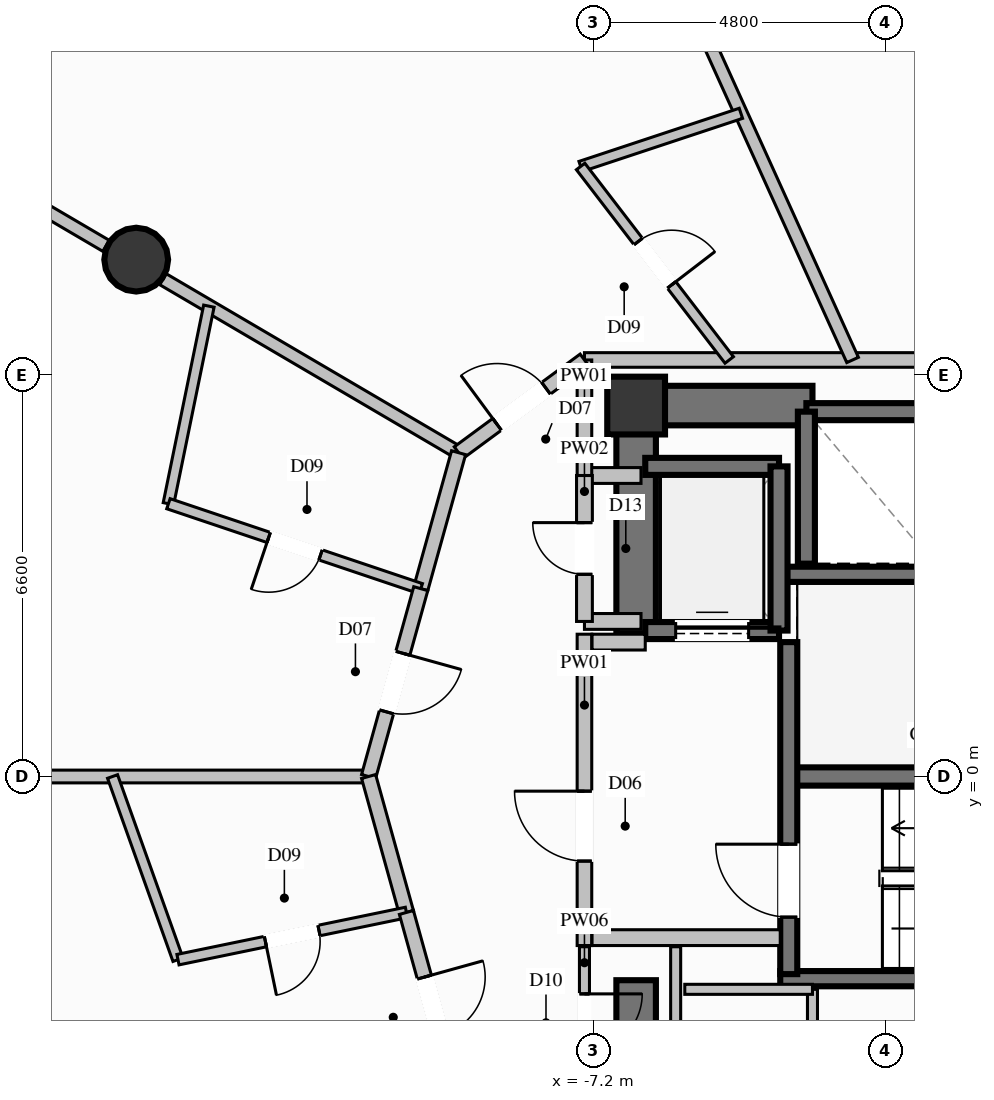
"""IFC4 building model, lengths in metres.
Left out: names, types, materials, properties, quantities, classifications, styles, units other than length and angle.
Written with IfcOpenShell. Run it as: python <this file> out.ifc"""

import sys

from ifc_helpers import new_model, si_unit, direction, frame, frame_2d, origin, origin_2d, place, context, subcontext, project, spatial, rectangle, circle, extrude, element, fill, save


model = new_model("IFC4")
c1 = context("Model", 3, precision=1e-05, world=origin(), true_north=direction((0.0, 1.0)))
c2 = subcontext(c1, "Body", "Model", "MODEL_VIEW")
j1 = project(units=[si_unit("LENGTHUNIT", "METRE"), si_unit("PLANEANGLEUNIT", "RADIAN")], contexts=[c1])
p1 = place(None, origin())
s1 = spatial("IfcSite", under=j1, at=p1, CompositionType="ELEMENT")
p2 = place(p1, origin())
s2 = spatial("IfcBuilding", under=s1, at=p2, CompositionType="ELEMENT")
p3 = place(p2, frame((0.0, 0.0, 127.8)))
s3 = spatial("IfcBuildingStorey", under=s2, at=p3, CompositionType="ELEMENT", Elevation=127.8)
p4 = place(p3, frame((-6.5, 6.1, 0.0), z_axis=(0.0, 0.0, 1.0), x_axis=(1.0, 0.0, 0.0)))
e1 = element("IfcColumn", 1, at=p4, inside=s3, PredefinedType="COLUMN", context=c2, shape_type="SweptSolid", body=[
    extrude(rectangle(XDim=0.95, YDim=0.95, at=origin_2d()), origin(), (0.0, 0.0, 1.0), 3.6),
])
p5 = place(p3, frame((-3.99, 0.0, 0.0), z_axis=(0.0, 0.0, 1.0), x_axis=(1.0, 0.0, 0.0)))
e2 = element("IfcWall", 2, at=p5, inside=s3, PredefinedType="SHEAR", context=c2, shape_type="SweptSolid", body=[
    extrude(rectangle(XDim=7.98, YDim=0.3, at=frame_2d((3.99, 0.0))), origin(), (0.0, 0.0, 1.0), 3.6),
])
for number, where, z_axis, x_axis in (
    (3, (-4.13, -3.325, 0.0), (0.0, 0.0, 1.0), (1.0, 0.0, 0.0)),
    (4, (-4.13, 3.325, 0.0), (0.0, 0.0, 1.0), (1.0, 0.0, 0.0)),
):
    element("IfcWall", number, at=place(p3, frame(where, z_axis=z_axis, x_axis=x_axis)), inside=s3, PredefinedType="SOLIDWALL", context=c2, shape_type="SweptSolid", body=[
        extrude(rectangle(XDim=8.26, YDim=0.25, at=frame_2d((4.13, 0.0))), origin(), (0.0, 0.0, 1.0), 3.6),
    ])
p6 = place(p3, frame((-6.175, 6.1, 0.0), z_axis=(0.0, 0.0, 1.0), x_axis=(1.0, 0.0, 0.0)))
e5 = element("IfcWall", 5, at=p6, inside=s3, PredefinedType="SHEAR", context=c2, shape_type="SweptSolid", body=[
    extrude(rectangle(XDim=2.575, YDim=0.65, at=frame_2d((1.288, 0.0))), origin(), (0.0, 0.0, 1.0), 3.6),
])
p7 = place(p3, frame((-6.5, 2.35, 0.0), z_axis=(0.0, 0.0, 1.0), x_axis=(0.0, 1.0, 0.0)))
e6 = element("IfcWall", 6, at=p7, inside=s3, PredefinedType="SHEAR", context=c2, shape_type="SweptSolid", body=[
    extrude(rectangle(XDim=4.075, YDim=0.65, at=frame_2d((2.038, 0.0))), origin(), (0.0, 0.0, 1.0), 3.6),
])
p8 = place(p3, frame((-6.5, -6.425, 0.0), z_axis=(0.0, 0.0, 1.0), x_axis=(0.0, 1.0, 0.0)))
e7 = element("IfcWall", 7, at=p8, inside=s3, PredefinedType="SHEAR", context=c2, shape_type="SweptSolid", body=[
    extrude(rectangle(XDim=3.075, YDim=0.65, at=frame_2d((1.538, 0.0))), origin(), (0.0, 0.0, 1.0), 3.6),
])
p9 = place(p3, frame((-14.722, 8.5, 0.0), z_axis=(0.0, 0.0, 1.0), x_axis=(1.0, 0.0, 0.0)))
e8 = element("IfcColumn", 8, at=p9, inside=s3, PredefinedType="COLUMN", context=c2, shape_type="SweptSolid", body=[
    extrude(circle(Radius=0.525, at=origin_2d()), origin(), (0.0, 0.0, 1.0), 3.6),
])
p10 = place(p3, frame((-1.6, 6.0, 0.0), z_axis=(0.0, 0.0, 1.0), x_axis=(-1.0, 0.0, 0.0)))
e9 = element("IfcWall", 9, at=p10, inside=s3, PredefinedType="SOLIDWALL", context=c2, shape_type="SweptSolid", body=[
    extrude(rectangle(XDim=2.1, YDim=0.28, at=frame_2d((1.05, 0.0))), origin(), (0.0, 0.0, 1.0), 3.35),
])
p11 = place(p3, frame((-3.7, 6.0, 0.0), z_axis=(0.0, 0.0, 1.0), x_axis=(0.0, -1.0, 0.0)))
e10 = element("IfcWall", 10, at=p11, inside=s3, PredefinedType="SOLIDWALL", context=c2, shape_type="SweptSolid", body=[
    extrude(rectangle(XDim=2.5, YDim=0.28, at=frame_2d((1.25, 0.0))), origin(), (0.0, 0.0, 1.0), 3.35),
])
p12 = place(p3, frame((-6.35, 2.4, 0.0), z_axis=(0.0, 0.0, 1.0), x_axis=(1.0, 0.0, 0.0)))
e11 = element("IfcWall", 11, at=p12, inside=s3, PredefinedType="SOLIDWALL", context=c2, shape_type="SweptSolid", body=[
    extrude(rectangle(XDim=2.2, YDim=0.28, at=frame_2d((1.1, 0.0))), origin(), (0.0, 0.0, 1.0), 3.35),
])
p13 = place(p12, frame((0.5, 0.0, 0.0)))
e12 = element("IfcOpeningElement", 12, at=p13, cuts=e11, PredefinedType="OPENING", context=c2, shape_type="SweptSolid", body=[
    extrude(rectangle(XDim=1.2, YDim=2.2, at=frame_2d((0.6, 1.1))), frame((0.0, 0.15, 0.0), z_axis=(0.0, -1.0, 0.0), x_axis=(1.0, 0.0, 0.0)), (0.0, 0.0, 1.0), 0.3),
])
p14 = place(p3, frame((-4.15, 5.1, 0.0), z_axis=(0.0, 0.0, 1.0), x_axis=(-1.0, 0.0, 0.0)))
e13 = element("IfcWall", 13, at=p14, inside=s3, PredefinedType="SOLIDWALL", context=c2, shape_type="SweptSolid", body=[
    extrude(rectangle(XDim=2.2, YDim=0.28, at=frame_2d((1.1, 0.0))), origin(), (0.0, 0.0, 1.0), 3.35),
])
p15 = place(p3, frame((-4.15, 2.4, 0.0), z_axis=(0.0, 0.0, 1.0), x_axis=(0.0, 1.0, 0.0)))
e14 = element("IfcWall", 14, at=p15, inside=s3, PredefinedType="SOLIDWALL", context=c2, shape_type="SweptSolid", body=[
    extrude(rectangle(XDim=2.7, YDim=0.28, at=frame_2d((1.35, 0.0))), origin(), (0.0, 0.0, 1.0), 3.35),
])
p16 = place(p3, frame((-3.99, -3.25, 0.0), z_axis=(0.0, 0.0, 1.0), x_axis=(0.0, 1.0, 0.0)))
e15 = element("IfcWall", 15, at=p16, inside=s3, PredefinedType="SOLIDWALL", context=c2, shape_type="SweptSolid", body=[
    extrude(rectangle(XDim=5.46, YDim=0.28, at=frame_2d((2.73, 0.0))), origin(), (0.0, 0.0, 1.0), 3.35),
])
p17 = place(p16, frame((0.937, 0.0, 0.0)))
e16 = element("IfcOpeningElement", 16, at=p17, cuts=e15, PredefinedType="OPENING", context=c2, shape_type="SweptSolid", body=[
    extrude(rectangle(XDim=1.2, YDim=2.2, at=frame_2d((0.6, 1.1))), frame((0.0, 0.15, 0.0), z_axis=(0.0, -1.0, 0.0), x_axis=(1.0, 0.0, 0.0)), (0.0, 0.0, 1.0), 0.3),
])
p18 = place(p3, frame((-7.35, -2.78, 0.0), z_axis=(0.0, 0.0, 1.0), x_axis=(0.0, 1.0, 0.0)))
e17 = element("IfcWall", 17, at=p18, inside=s3, PredefinedType="PARTITIONING", context=c2, shape_type="SweptSolid", body=[
    extrude(rectangle(XDim=5.12, YDim=0.24, at=frame_2d((2.56, 0.0))), origin(), (0.0, 0.0, 1.0), 2.435),
])
p19 = place(p18, frame((1.389, 0.0, 0.0)))
e18 = element("IfcOpeningElement", 18, at=p19, cuts=e17, PredefinedType="OPENING", context=c2, shape_type="SweptSolid", body=[
    extrude(rectangle(XDim=1.15, YDim=2.2, at=frame_2d((0.575, 1.1))), frame((0.0, 0.13, 0.0), z_axis=(0.0, -1.0, 0.0), x_axis=(1.0, 0.0, 0.0)), (0.0, 0.0, 1.0), 0.26),
])
p20 = place(p3, frame((-7.225, -2.65, 0.0), z_axis=(0.0, 0.0, 1.0), x_axis=(1.0, 0.0, 0.0)))
e19 = element("IfcWall", 19, at=p20, inside=s3, PredefinedType="PARTITIONING", context=c2, shape_type="SweptSolid", body=[
    extrude(rectangle(XDim=3.095, YDim=0.26, at=frame_2d((1.548, 0.0))), origin(), (0.0, 0.0, 1.0), 3.35),
])
p21 = place(p3, frame((-7.225, 2.21, 0.0), z_axis=(0.0, 0.0, 1.0), x_axis=(1.0, 0.0, 0.0)))
e20 = element("IfcWall", 20, at=p21, inside=s3, PredefinedType="PARTITIONING", context=c2, shape_type="SweptSolid", body=[
    extrude(rectangle(XDim=0.875, YDim=0.26, at=frame_2d((0.438, 0.0))), origin(), (0.0, 0.0, 1.0), 3.35),
])
for number, where, z_axis, x_axis in (
    (21, (-7.35, 4.95, 0.0), (0.0, 0.0, 1.0), (1.0, 0.0, 0.0)),
    (22, (-7.35, 2.55, 0.0), (0.0, 0.0, 1.0), (1.0, 0.0, 0.0)),
):
    element("IfcWall", number, at=place(p3, frame(where, z_axis=z_axis, x_axis=x_axis)), inside=s3, PredefinedType="PARTITIONING", context=c2, shape_type="SweptSolid", body=[
        extrude(rectangle(XDim=0.93, YDim=0.26, at=frame_2d((0.465, 0.0))), origin(), (0.0, 0.0, 1.0), 3.35),
    ])
p22 = place(p3, frame((-7.35, 2.55, 0.0), z_axis=(0.0, 0.0, 1.0), x_axis=(0.0, 1.0, 0.0)))
e23 = element("IfcWall", 23, at=p22, inside=s3, PredefinedType="PARTITIONING", context=c2, shape_type="SweptSolid", body=[
    extrude(rectangle(XDim=2.4, YDim=0.26, at=frame_2d((1.2, 0.0))), origin(), (0.0, 0.0, 1.0), 2.435),
])
p23 = place(p22, frame((0.775, 0.0, 0.0)))
e24 = element("IfcOpeningElement", 24, at=p23, cuts=e23, PredefinedType="OPENING", context=c2, shape_type="SweptSolid", body=[
    extrude(rectangle(XDim=0.85, YDim=2.05, at=frame_2d((0.425, 1.025))), frame((0.0, 0.14, 0.0), z_axis=(0.0, -1.0, 0.0), x_axis=(1.0, 0.0, 0.0)), (0.0, 0.0, 1.0), 0.28),
])
p24 = place(p3, frame((-7.35, 6.85, 0.0), z_axis=(0.0, 0.0, 1.0), x_axis=(1.0, 0.0, 0.0)))
e25 = element("IfcWall", 25, at=p24, inside=s3, PredefinedType="PARTITIONING", context=c2, shape_type="SweptSolid", body=[
    extrude(rectangle(XDim=14.7, YDim=0.24, at=frame_2d((7.35, 0.0))), origin(), (0.0, 0.0, 1.0), 2.435),
])
p25 = place(p3, frame((-7.35, 4.95, 0.0), z_axis=(0.0, 0.0, 1.0), x_axis=(0.0, 1.0, 0.0)))
e26 = element("IfcWall", 26, at=p25, inside=s3, PredefinedType="PARTITIONING", context=c2, shape_type="SweptSolid", body=[
    extrude(rectangle(XDim=1.9, YDim=0.24, at=frame_2d((0.95, 0.0))), origin(), (0.0, 0.0, 1.0), 2.435),
])
p26 = place(p3, frame((-5.85, -5.3, 0.0), z_axis=(0.0, 0.0, 1.0), x_axis=(0.0, 1.0, 0.0)))
e27 = element("IfcWall", 27, at=p26, inside=s3, PredefinedType="PARTITIONING", context=c2, shape_type="SweptSolid", body=[
    extrude(rectangle(XDim=2.5, YDim=0.165, at=frame_2d((1.25, 0.0))), origin(), (0.0, 0.0, 1.0), 2.435),
])
p27 = place(p3, frame((-7.35, -2.8, 0.0), z_axis=(0.0, 0.0, 1.0), x_axis=(0.0, -1.0, 0.0)))
e28 = element("IfcWall", 28, at=p27, inside=s3, PredefinedType="PARTITIONING", context=c2, shape_type="SweptSolid", body=[
    extrude(rectangle(XDim=2.5, YDim=0.165, at=frame_2d((1.25, 0.0))), origin(), (0.0, 0.0, 1.0), 3.35),
])
p28 = place(p27, frame((0.775, 0.0, 0.0)))
e29 = element("IfcOpeningElement", 29, at=p28, cuts=e28, PredefinedType="OPENING", context=c2, shape_type="SweptSolid", body=[
    extrude(rectangle(XDim=0.95, YDim=2.1, at=frame_2d((0.475, 1.05))), frame((0.0, 0.093, 0.0), z_axis=(0.0, -1.0, 0.0), x_axis=(1.0, 0.0, 0.0)), (0.0, 0.0, 1.0), 0.185),
])
p29 = place(p3, frame((-3.6, -6.85, 0.0), z_axis=(0.0, 0.0, 1.0), x_axis=(0.0, 1.0, 0.0)))
e30 = element("IfcWall", 30, at=p29, inside=s3, PredefinedType="PARTITIONING", context=c2, shape_type="SweptSolid", body=[
    extrude(rectangle(XDim=3.35, YDim=0.165, at=frame_2d((1.675, 0.0))), origin(), (0.0, 0.0, 1.0), 3.35),
])
p30 = place(p3, frame((-3.6, -3.5, 0.0), z_axis=(0.0, 0.0, 1.0), x_axis=(-1.0, 0.0, 0.0)))
e31 = element("IfcWall", 31, at=p30, inside=s3, PredefinedType="PARTITIONING", context=c2, shape_type="SweptSolid", body=[
    extrude(rectangle(XDim=2.1, YDim=0.165, at=frame_2d((1.05, 0.0))), origin(), (0.0, 0.0, 1.0), 3.35),
])
p31 = place(p3, frame((-9.42, 5.325, 0.0), z_axis=(0.0, 0.0, 1.0), x_axis=(-0.862477017481, 0.506096230293, 0.0)))
e32 = element("IfcWall", 32, at=p31, inside=s3, PredefinedType="PARTITIONING", context=c2, shape_type="SweptSolid", body=[
    extrude(rectangle(XDim=5.637, YDim=0.21, at=frame_2d((2.819, 0.0))), origin(), (0.0, 0.0, 1.0), 2.717),
])
p32 = place(p3, frame((-15.218, 8.727, 0.0), z_axis=(0.0, 0.0, 1.0), x_axis=(-0.862512809527, 0.506035229409, 0.0)))
e33 = element("IfcWall", 33, at=p32, inside=s3, PredefinedType="PARTITIONING", context=c2, shape_type="SweptSolid", body=[
    extrude(rectangle(XDim=7.282, YDim=0.21, at=frame_2d((3.641, 0.0))), origin(), (0.0, 0.0, 1.0), 3.35),
])
p33 = place(p3, frame((-10.9, 0.0, 0.0), z_axis=(0.0, 0.0, 1.0), x_axis=(-1.0, 0.0, 0.0)))
e34 = element("IfcWall", 34, at=p33, inside=s3, PredefinedType="PARTITIONING", context=c2, shape_type="SweptSolid", body=[
    extrude(rectangle(XDim=5.555, YDim=0.21, at=frame_2d((2.778, 0.0))), origin(), (0.0, 0.0, 1.0), 3.35),
])
p34 = place(p3, frame((-2.94, 6.85, 0.0), z_axis=(0.0, 0.0, 1.0), x_axis=(-0.412479187099, 0.910967024765, 0.0)))
e35 = element("IfcWall", 35, at=p34, inside=s3, PredefinedType="PARTITIONING", context=c2, shape_type="SweptSolid", body=[
    extrude(rectangle(XDim=15.902, YDim=0.21, at=frame_2d((7.951, 0.0))), origin(), (0.0, 0.0, 1.0), 3.35),
])
p35 = place(p3, frame((-7.413, 10.032, 0.0), z_axis=(0.0, 0.0, 1.0), x_axis=(0.949183203982, 0.314724078008, 0.0)))
e36 = element("IfcWall", 36, at=p35, inside=s3, PredefinedType="PLUMBINGWALL", context=c2, shape_type="SweptSolid", body=[
    extrude(rectangle(XDim=2.777, YDim=0.175, at=frame_2d((1.389, 0.0))), origin(), (0.0, 0.0, 1.0), 3.35),
])
p36 = place(p3, frame((-7.413, 10.032, 0.0), z_axis=(0.0, 0.0, 1.0), x_axis=(0.609160709833, -0.793046801643, 0.0)))
e37 = element("IfcWall", 37, at=p36, inside=s3, PredefinedType="PLUMBINGWALL", context=c2, shape_type="SweptSolid", body=[
    extrude(rectangle(XDim=4.012, YDim=0.175, at=frame_2d((2.006, 0.0))), origin(), (0.0, 0.0, 1.0), 2.717),
])
p37 = place(p36, frame((1.556, 0.0, 0.0)))
e38 = element("IfcOpeningElement", 38, at=p37, cuts=e37, PredefinedType="OPENING", context=c2, shape_type="SweptSolid", body=[
    extrude(rectangle(XDim=0.9, YDim=2.1, at=frame_2d((0.45, 1.05))), frame((0.0, 0.098, 0.0), z_axis=(0.0, -1.0, 0.0), x_axis=(1.0, 0.0, 0.0)), (0.0, 0.0, 1.0), 0.195),
])
p38 = place(p3, frame((-9.42, 5.325, 0.0), z_axis=(0.0, 0.0, 1.0), x_axis=(0.805053450612, 0.593202277185, 0.0)))
e39 = element("IfcWall", 39, at=p38, inside=s3, PredefinedType="PARTITIONING", context=c2, shape_type="SweptSolid", body=[
    extrude(rectangle(XDim=2.571, YDim=0.24, at=frame_2d((1.286, 0.0))), origin(), (0.0, 0.0, 1.0), 3.35),
])
p39 = place(p38, frame((0.786, 0.0, 0.0)))
e40 = element("IfcOpeningElement", 40, at=p39, cuts=e39, PredefinedType="OPENING", context=c2, shape_type="SweptSolid", body=[
    extrude(rectangle(XDim=1.0, YDim=2.2, at=frame_2d((0.5, 1.1))), frame((0.0, 0.13, 0.0), z_axis=(0.0, -1.0, 0.0), x_axis=(1.0, 0.0, 0.0)), (0.0, 0.0, 1.0), 0.26),
])
p40 = place(p3, frame((-9.42, 5.325, 0.0), z_axis=(0.0, 0.0, 1.0), x_axis=(-0.268045342481, -0.963406297662, 0.0)))
e41 = element("IfcWall", 41, at=p40, inside=s3, PredefinedType="PARTITIONING", context=c2, shape_type="SweptSolid", body=[
    extrude(rectangle(XDim=2.321, YDim=0.24, at=frame_2d((1.16, 0.0))), origin(), (0.0, 0.0, 1.0), 3.35),
])
p41 = place(p3, frame((-13.527, 7.735, 0.0), z_axis=(0.0, 0.0, 1.0), x_axis=(-0.200460473107, -0.979701790711, 0.0)))
e42 = element("IfcWall", 42, at=p41, inside=s3, PredefinedType="PLUMBINGWALL", context=c2, shape_type="SweptSolid", body=[
    extrude(rectangle(XDim=3.316, YDim=0.175, at=frame_2d((1.658, 0.0))), origin(), (0.0, 0.0, 1.0), 3.35),
])
p42 = place(p3, frame((-10.042, 3.089, 0.0), z_axis=(0.0, 0.0, 1.0), x_axis=(-0.947742433388, 0.319036486872, 0.0)))
e43 = element("IfcWall", 43, at=p42, inside=s3, PredefinedType="PLUMBINGWALL", context=c2, shape_type="SweptSolid", body=[
    extrude(rectangle(XDim=4.379, YDim=0.175, at=frame_2d((2.189, 0.0))), origin(), (0.0, 0.0, 1.0), 3.35),
])
p43 = place(p42, frame((1.739, 0.0, 0.0)))
e44 = element("IfcOpeningElement", 44, at=p43, cuts=e43, PredefinedType="OPENING", context=c2, shape_type="SweptSolid", body=[
    extrude(rectangle(XDim=0.9, YDim=2.1, at=frame_2d((0.45, 1.05))), frame((0.0, 0.098, 0.0), z_axis=(0.0, -1.0, 0.0), x_axis=(1.0, 0.0, 0.0)), (0.0, 0.0, 1.0), 0.195),
])
p44 = place(p3, frame((-10.042, 3.089, 0.0), z_axis=(0.0, 0.0, 1.0), x_axis=(-0.267592805492, -0.963532091032, 0.0)))
e45 = element("IfcWall", 45, at=p44, inside=s3, PredefinedType="PARTITIONING", context=c2, shape_type="SweptSolid", body=[
    extrude(rectangle(XDim=3.206, YDim=0.24, at=frame_2d((1.603, 0.0))), origin(), (0.0, 0.0, 1.0), 3.35),
])
p45 = place(p44, frame((1.103, 0.0, 0.0)))
e46 = element("IfcOpeningElement", 46, at=p45, cuts=e45, PredefinedType="OPENING", context=c2, shape_type="SweptSolid", body=[
    extrude(rectangle(XDim=1.0, YDim=2.2, at=frame_2d((0.5, 1.1))), frame((0.0, 0.13, 0.0), z_axis=(0.0, -1.0, 0.0), x_axis=(1.0, 0.0, 0.0)), (0.0, 0.0, 1.0), 0.26),
])
p46 = place(p3, frame((-10.9, 0.0, 0.0), z_axis=(0.0, 0.0, 1.0), x_axis=(0.267920543299, -0.963441011416, 0.0)))
e47 = element("IfcWall", 47, at=p46, inside=s3, PredefinedType="PARTITIONING", context=c2, shape_type="SweptSolid", body=[
    extrude(rectangle(XDim=2.321, YDim=0.24, at=frame_2d((1.161, 0.0))), origin(), (0.0, 0.0, 1.0), 3.35),
])
p47 = place(p3, frame((-15.111, 0.0, 0.0), z_axis=(0.0, 0.0, 1.0), x_axis=(0.336466950823, -0.941695275025, 0.0)))
e48 = element("IfcWall", 48, at=p47, inside=s3, PredefinedType="PLUMBINGWALL", context=c2, shape_type="SweptSolid", body=[
    extrude(rectangle(XDim=3.198, YDim=0.175, at=frame_2d((1.599, 0.0))), origin(), (0.0, 0.0, 1.0), 3.35),
])
p48 = place(p3, frame((-10.278, -2.236, 0.0), z_axis=(0.0, 0.0, 1.0), x_axis=(-0.979332635471, -0.202256246135, 0.0)))
e49 = element("IfcWall", 49, at=p48, inside=s3, PredefinedType="PLUMBINGWALL", context=c2, shape_type="SweptSolid", body=[
    extrude(rectangle(XDim=3.836, YDim=0.175, at=frame_2d((1.918, 0.0))), origin(), (0.0, 0.0, 1.0), 3.35),
])
p49 = place(p48, frame((1.468, 0.0, 0.0)))
e50 = element("IfcOpeningElement", 50, at=p49, cuts=e49, PredefinedType="OPENING", context=c2, shape_type="SweptSolid", body=[
    extrude(rectangle(XDim=0.9, YDim=2.1, at=frame_2d((0.45, 1.05))), frame((0.0, 0.098, 0.0), z_axis=(0.0, -1.0, 0.0), x_axis=(1.0, 0.0, 0.0)), (0.0, 0.0, 1.0), 0.195),
])
p50 = place(p3, frame((-10.278, -2.236, 0.0), z_axis=(0.0, 0.0, 1.0), x_axis=(0.267683140967, -0.96350699844, 0.0)))
e51 = element("IfcWall", 51, at=p50, inside=s3, PredefinedType="PARTITIONING", context=c2, shape_type="SweptSolid", body=[
    extrude(rectangle(XDim=3.206, YDim=0.24, at=frame_2d((1.603, 0.0))), origin(), (0.0, 0.0, 1.0), 3.35),
])
p51 = place(p50, frame((1.103, 0.0, 0.0)))
e52 = element("IfcOpeningElement", 52, at=p51, cuts=e51, PredefinedType="OPENING", context=c2, shape_type="SweptSolid", body=[
    extrude(rectangle(XDim=1.0, YDim=2.2, at=frame_2d((0.5, 1.1))), frame((0.0, 0.13, 0.0), z_axis=(0.0, -1.0, 0.0), x_axis=(1.0, 0.0, 0.0)), (0.0, 0.0, 1.0), 0.26),
])
p52 = place(p13, origin())
e53 = element("IfcDoor", 53, at=p52, inside=s3, OperationType="SLIDING_TO_LEFT", PredefinedType="DOOR", context=c2, shape_type="SweptSolid", body=[
    extrude(rectangle(XDim=1.2, YDim=2.2, at=frame_2d((0.6, 1.1))), frame((0.0, 0.025, 0.0), z_axis=(0.0, -1.0, 0.0), x_axis=(1.0, 0.0, 0.0)), (0.0, 0.0, 1.0), 0.05),
])
fill(e12, e53)
p53 = place(p17, origin())
e54 = element("IfcDoor", 54, at=p53, inside=s3, OperationType="SINGLE_SWING_RIGHT", PredefinedType="DOOR", context=c2, shape_type="SweptSolid", body=[
    extrude(rectangle(XDim=1.2, YDim=2.2, at=frame_2d((0.6, 1.1))), frame((0.0, 0.025, 0.0), z_axis=(0.0, -1.0, 0.0), x_axis=(1.0, 0.0, 0.0)), (0.0, 0.0, 1.0), 0.05),
])
fill(e16, e54)
p54 = place(p19, origin())
e55 = element("IfcDoor", 55, at=p54, inside=s3, OperationType="SINGLE_SWING_RIGHT", PredefinedType="DOOR", context=c2, shape_type="SweptSolid", body=[
    extrude(rectangle(XDim=1.15, YDim=2.2, at=frame_2d((0.575, 1.1))), frame((0.0, 0.025, 0.0), z_axis=(0.0, -1.0, 0.0), x_axis=(1.0, 0.0, 0.0)), (0.0, 0.0, 1.0), 0.05),
])
fill(e18, e55)
p55 = place(p23, origin())
e56 = element("IfcDoor", 56, at=p55, inside=s3, OperationType="SINGLE_SWING_RIGHT", PredefinedType="DOOR", context=c2, shape_type="SweptSolid", body=[
    extrude(rectangle(XDim=0.85, YDim=2.05, at=frame_2d((0.425, 1.025))), frame((0.0, 0.025, 0.0), z_axis=(0.0, -1.0, 0.0), x_axis=(1.0, 0.0, 0.0)), (0.0, 0.0, 1.0), 0.05),
])
fill(e24, e56)
p56 = place(p28, origin())
e57 = element("IfcDoor", 57, at=p56, inside=s3, OperationType="SINGLE_SWING_LEFT", PredefinedType="DOOR", context=c2, shape_type="SweptSolid", body=[
    extrude(rectangle(XDim=0.95, YDim=2.1, at=frame_2d((0.475, 1.05))), frame((0.0, 0.025, 0.0), z_axis=(0.0, -1.0, 0.0), x_axis=(1.0, 0.0, 0.0)), (0.0, 0.0, 1.0), 0.05),
])
fill(e29, e57)
p57 = place(p37, origin())
e58 = element("IfcDoor", 58, at=p57, inside=s3, OperationType="SINGLE_SWING_RIGHT", PredefinedType="DOOR", context=c2, shape_type="SweptSolid", body=[
    extrude(rectangle(XDim=0.9, YDim=2.1, at=frame_2d((0.45, 1.05))), frame((0.0, 0.025, 0.0), z_axis=(0.0, -1.0, 0.0), x_axis=(1.0, 0.0, 0.0)), (0.0, 0.0, 1.0), 0.05),
])
fill(e38, e58)
p58 = place(p39, origin())
e59 = element("IfcDoor", 59, at=p58, inside=s3, OperationType="SINGLE_SWING_LEFT", PredefinedType="DOOR", context=c2, shape_type="SweptSolid", body=[
    extrude(rectangle(XDim=1.0, YDim=2.2, at=frame_2d((0.5, 1.1))), frame((0.0, 0.025, 0.0), z_axis=(0.0, -1.0, 0.0), x_axis=(1.0, 0.0, 0.0)), (0.0, 0.0, 1.0), 0.05),
])
fill(e40, e59)
p59 = place(p43, origin())
e60 = element("IfcDoor", 60, at=p59, inside=s3, OperationType="SINGLE_SWING_RIGHT", PredefinedType="DOOR", context=c2, shape_type="SweptSolid", body=[
    extrude(rectangle(XDim=0.9, YDim=2.1, at=frame_2d((0.45, 1.05))), frame((0.0, 0.025, 0.0), z_axis=(0.0, -1.0, 0.0), x_axis=(1.0, 0.0, 0.0)), (0.0, 0.0, 1.0), 0.05),
])
fill(e44, e60)
p60 = place(p45, origin())
e61 = element("IfcDoor", 61, at=p60, inside=s3, OperationType="SINGLE_SWING_LEFT", PredefinedType="DOOR", context=c2, shape_type="SweptSolid", body=[
    extrude(rectangle(XDim=1.0, YDim=2.2, at=frame_2d((0.5, 1.1))), frame((0.0, 0.025, 0.0), z_axis=(0.0, -1.0, 0.0), x_axis=(1.0, 0.0, 0.0)), (0.0, 0.0, 1.0), 0.05),
])
fill(e46, e61)
p61 = place(p49, origin())
e62 = element("IfcDoor", 62, at=p61, inside=s3, OperationType="SINGLE_SWING_RIGHT", PredefinedType="DOOR", context=c2, shape_type="SweptSolid", body=[
    extrude(rectangle(XDim=0.9, YDim=2.1, at=frame_2d((0.45, 1.05))), frame((0.0, 0.025, 0.0), z_axis=(0.0, -1.0, 0.0), x_axis=(1.0, 0.0, 0.0)), (0.0, 0.0, 1.0), 0.05),
])
fill(e50, e62)
p62 = place(p51, origin())
e63 = element("IfcDoor", 63, at=p62, inside=s3, OperationType="SINGLE_SWING_LEFT", PredefinedType="DOOR", context=c2, shape_type="SweptSolid", body=[
    extrude(rectangle(XDim=1.0, YDim=2.2, at=frame_2d((0.5, 1.1))), frame((0.0, 0.025, 0.0), z_axis=(0.0, -1.0, 0.0), x_axis=(1.0, 0.0, 0.0)), (0.0, 0.0, 1.0), 0.05),
])
fill(e52, e63)
save(model, sys.argv[1])
